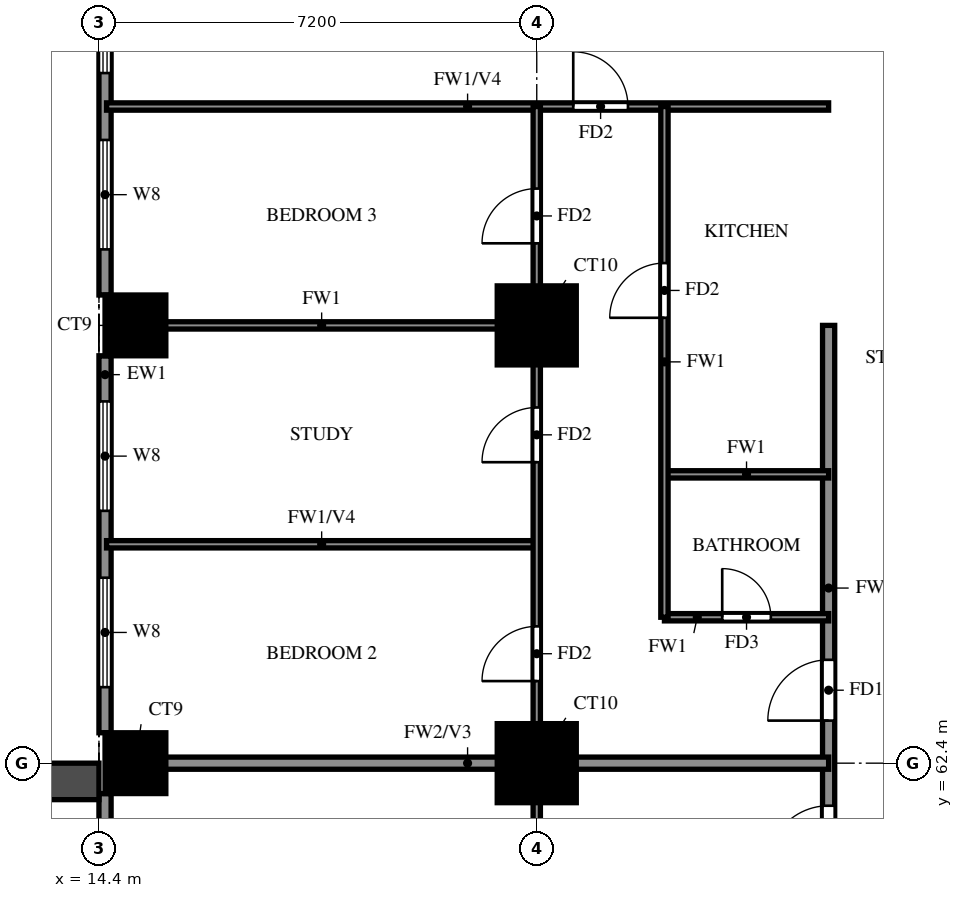
"""IFC4 building model, lengths in metres.
Left out: names, types, materials, properties, quantities, classifications, styles, units other than length and angle.
Written with IfcOpenShell. Run it as: python <this file> out.ifc"""

import sys

from ifc_helpers import new_model, si_unit, direction, frame, frame_2d, origin, origin_2d, place, context, subcontext, project, spatial, rectangle, extrude, source, transform, mapped, element, fill, save


model = new_model("IFC4")
c1 = context("Model", 3, precision=1e-05, world=origin(), true_north=direction((0.0, 1.0)))
c2 = subcontext(c1, "Body", "Model", "MODEL_VIEW")
j1 = project(units=[si_unit("LENGTHUNIT", "METRE"), si_unit("PLANEANGLEUNIT", "RADIAN")], contexts=[c1])
p1 = place(None, origin())
s1 = spatial("IfcSite", under=j1, at=p1, CompositionType="ELEMENT")
p2 = place(p1, origin())
s2 = spatial("IfcBuilding", under=s1, at=p2, CompositionType="ELEMENT")
p3 = place(p2, frame((0.0, 0.0, 69.0)))
s3 = spatial("IfcBuildingStorey", under=s2, at=p3, CompositionType="ELEMENT", Elevation=69.0)
m1 = source(origin(), c2, "Body", "SweptSolid", [
    extrude(rectangle(XDim=1.0, YDim=1.0, at=origin_2d()), origin(), (0.0, 0.0, 1.0), 3.18),
])
p4 = place(p3, frame((15.0, 62.4, 0.0), z_axis=(0.0, 0.0, 1.0), x_axis=(1.0, 0.0, 0.0)))
e1 = element("IfcColumn", 1, at=p4, inside=s3, PredefinedType="COLUMN", context=c2, shape_type="MappedRepresentation", body=[
    mapped(m1, transform((0.0, 0.0, 0.0))),
])
m2 = source(origin(), c2, "Body", "SweptSolid", [
    extrude(rectangle(XDim=1.3, YDim=1.3, at=origin_2d()), origin(), (0.0, 0.0, 1.0), 3.18),
])
p5 = place(p3, frame((21.6, 62.4, 0.0), z_axis=(0.0, 0.0, 1.0), x_axis=(1.0, 0.0, 0.0)))
e2 = element("IfcColumn", 2, at=p5, inside=s3, PredefinedType="COLUMN", context=c2, shape_type="MappedRepresentation", body=[
    mapped(m2, transform((0.0, 0.0, 0.0))),
])
p6 = place(p3, frame((15.0, 69.6, 0.0), z_axis=(0.0, 0.0, 1.0), x_axis=(1.0, 0.0, 0.0)))
e3 = element("IfcColumn", 3, at=p6, inside=s3, PredefinedType="COLUMN", context=c2, shape_type="MappedRepresentation", body=[
    mapped(m1, transform((0.0, 0.0, 0.0))),
])
p7 = place(p3, frame((21.6, 69.6, 0.0), z_axis=(0.0, 0.0, 1.0), x_axis=(1.0, 0.0, 0.0)))
e4 = element("IfcColumn", 4, at=p7, inside=s3, PredefinedType="COLUMN", context=c2, shape_type="MappedRepresentation", body=[
    mapped(m2, transform((0.0, 0.0, 0.0))),
])
p8 = place(p3, frame((14.5, 76.3, 0.0), z_axis=(0.0, 0.0, 1.0), x_axis=(0.0, -1.0, 0.0)))
e5 = element("IfcWall", 5, at=p8, inside=s3, PredefinedType="SOLIDWALL", context=c2, shape_type="SweptSolid", body=[
    extrude(rectangle(XDim=6.2, YDim=0.2, at=frame_2d((3.1, 0.0))), origin(), (0.0, 0.0, 1.0), 3.18),
])
p9 = place(p8, frame((3.65, 0.0, 0.6)))
e6 = element("IfcOpeningElement", 6, at=p9, cuts=e5, PredefinedType="OPENING", context=c2, shape_type="SweptSolid", body=[
    extrude(rectangle(XDim=1.8, YDim=2.4, at=frame_2d((0.9, 1.2))), frame((0.0, 0.11, 0.0), z_axis=(0.0, -1.0, 0.0), x_axis=(1.0, 0.0, 0.0)), (0.0, 0.0, 1.0), 0.22),
])
p10 = place(p8, frame((0.75, 0.0, 0.6)))
e7 = element("IfcOpeningElement", 7, at=p10, cuts=e5, PredefinedType="OPENING", context=c2, shape_type="SweptSolid", body=[
    extrude(rectangle(XDim=1.8, YDim=2.4, at=frame_2d((0.9, 1.2))), frame((0.0, 0.11, 0.0), z_axis=(0.0, -1.0, 0.0), x_axis=(1.0, 0.0, 0.0)), (0.0, 0.0, 1.0), 0.22),
])
p11 = place(p3, frame((14.5, 69.1, 0.0), z_axis=(0.0, 0.0, 1.0), x_axis=(0.0, -1.0, 0.0)))
e8 = element("IfcWall", 8, at=p11, inside=s3, PredefinedType="SOLIDWALL", context=c2, shape_type="SweptSolid", body=[
    extrude(rectangle(XDim=6.2, YDim=0.2, at=frame_2d((3.1, 0.0))), origin(), (0.0, 0.0, 1.0), 3.18),
])
p12 = place(p11, frame((3.65, 0.0, 0.6)))
e9 = element("IfcOpeningElement", 9, at=p12, cuts=e8, PredefinedType="OPENING", context=c2, shape_type="SweptSolid", body=[
    extrude(rectangle(XDim=1.8, YDim=2.4, at=frame_2d((0.9, 1.2))), frame((0.0, 0.11, 0.0), z_axis=(0.0, -1.0, 0.0), x_axis=(1.0, 0.0, 0.0)), (0.0, 0.0, 1.0), 0.22),
])
p13 = place(p11, frame((0.75, 0.0, 0.6)))
e10 = element("IfcOpeningElement", 10, at=p13, cuts=e8, PredefinedType="OPENING", context=c2, shape_type="SweptSolid", body=[
    extrude(rectangle(XDim=1.8, YDim=2.4, at=frame_2d((0.9, 1.2))), frame((0.0, 0.11, 0.0), z_axis=(0.0, -1.0, 0.0), x_axis=(1.0, 0.0, 0.0)), (0.0, 0.0, 1.0), 0.22),
])
p14 = place(p3, frame((14.5, 61.9, 0.0), z_axis=(0.0, 0.0, 1.0), x_axis=(0.0, -1.0, 0.0)))
e11 = element("IfcWall", 11, at=p14, inside=s3, PredefinedType="SOLIDWALL", context=c2, shape_type="SweptSolid", body=[
    extrude(rectangle(XDim=6.2, YDim=0.2, at=frame_2d((3.1, 0.0))), origin(), (0.0, 0.0, 1.0), 3.18),
])
p15 = place(p14, frame((2.2, 0.0, 0.0)))
e12 = element("IfcOpeningElement", 12, at=p15, cuts=e11, PredefinedType="OPENING", context=c2, shape_type="SweptSolid", body=[
    extrude(rectangle(XDim=1.8, YDim=2.4, at=frame_2d((0.9, 1.2))), frame((0.0, 0.11, 0.0), z_axis=(0.0, -1.0, 0.0), x_axis=(1.0, 0.0, 0.0)), (0.0, 0.0, 1.0), 0.22),
])
p16 = place(p14, frame((0.45, 0.0, 0.6)))
e13 = element("IfcOpeningElement", 13, at=p16, cuts=e11, PredefinedType="OPENING", context=c2, shape_type="SweptSolid", body=[
    extrude(rectangle(XDim=1.2, YDim=2.4, at=frame_2d((0.6, 1.2))), frame((0.0, 0.11, 0.0), z_axis=(0.0, -1.0, 0.0), x_axis=(1.0, 0.0, 0.0)), (0.0, 0.0, 1.0), 0.22),
])
p17 = place(p14, frame((4.55, 0.0, 0.6)))
e14 = element("IfcOpeningElement", 14, at=p17, cuts=e11, PredefinedType="OPENING", context=c2, shape_type="SweptSolid", body=[
    extrude(rectangle(XDim=1.2, YDim=2.4, at=frame_2d((0.6, 1.2))), frame((0.0, 0.11, 0.0), z_axis=(0.0, -1.0, 0.0), x_axis=(1.0, 0.0, 0.0)), (0.0, 0.0, 1.0), 0.22),
])
p18 = place(p3, frame((14.4, 62.1, 0.0), z_axis=(0.0, 0.0, 1.0), x_axis=(-1.0, 0.0, 0.0)))
e15 = element("IfcWall", 15, at=p18, inside=s3, PredefinedType="SOLIDWALL", context=c2, shape_type="SweptSolid", body=[
    extrude(rectangle(XDim=2.7, YDim=0.6, at=frame_2d((1.35, 0.0))), origin(), (0.0, 0.0, 1.0), 2.85),
])
p19 = place(p3, frame((26.4, 60.0, 0.0), z_axis=(0.0, 0.0, 1.0), x_axis=(0.0, 1.0, 0.0)))
e16 = element("IfcWall", 16, at=p19, inside=s3, PredefinedType="SOLIDWALL", context=c2, shape_type="SweptSolid", body=[
    extrude(rectangle(XDim=9.6, YDim=0.2, at=frame_2d((4.8, 0.0))), origin(), (0.0, 0.0, 1.0), 3.18),
])
p20 = place(p19, frame((0.7, 0.0, 0.0)))
e17 = element("IfcOpeningElement", 17, at=p20, cuts=e16, PredefinedType="OPENING", context=c2, shape_type="SweptSolid", body=[
    extrude(rectangle(XDim=1.0, YDim=2.1, at=frame_2d((0.5, 1.05))), frame((0.0, 0.11, 0.0), z_axis=(0.0, -1.0, 0.0), x_axis=(1.0, 0.0, 0.0)), (0.0, 0.0, 1.0), 0.22),
])
p21 = place(p19, frame((3.1, 0.0, 0.0)))
e18 = element("IfcOpeningElement", 18, at=p21, cuts=e16, PredefinedType="OPENING", context=c2, shape_type="SweptSolid", body=[
    extrude(rectangle(XDim=1.0, YDim=2.1, at=frame_2d((0.5, 1.05))), frame((0.0, 0.11, 0.0), z_axis=(0.0, -1.0, 0.0), x_axis=(1.0, 0.0, 0.0)), (0.0, 0.0, 1.0), 0.22),
])
p22 = place(p3, frame((14.525, 62.4, 0.0), z_axis=(0.0, 0.0, 1.0), x_axis=(1.0, 0.0, 0.0)))
e19 = element("IfcWall", 19, at=p22, inside=s3, PredefinedType="SOLIDWALL", context=c2, shape_type="SweptSolid", body=[
    extrude(rectangle(XDim=11.875, YDim=0.2, at=frame_2d((5.938, 0.0))), origin(), (0.0, 0.0, 1.0), 3.18),
])
p23 = place(p3, frame((23.7, 64.8, 0.0), z_axis=(0.0, 0.0, 1.0), x_axis=(1.0, 0.0, 0.0)))
e20 = element("IfcWall", 20, at=p23, inside=s3, PredefinedType="PARTITIONING", context=c2, shape_type="SweptSolid", body=[
    extrude(rectangle(XDim=2.7, YDim=0.12, at=frame_2d((1.35, 0.0))), origin(), (0.0, 0.0, 1.0), 3.18),
])
p24 = place(p23, frame((0.95, 0.0, 0.0)))
e21 = element("IfcOpeningElement", 21, at=p24, cuts=e20, PredefinedType="OPENING", context=c2, shape_type="SweptSolid", body=[
    extrude(rectangle(XDim=0.8, YDim=2.1, at=frame_2d((0.4, 1.05))), frame((0.0, 0.07, 0.0), z_axis=(0.0, -1.0, 0.0), x_axis=(1.0, 0.0, 0.0)), (0.0, 0.0, 1.0), 0.14),
])
p25 = place(p3, frame((14.525, 66.0, 0.0), z_axis=(0.0, 0.0, 1.0), x_axis=(1.0, 0.0, 0.0)))
e22 = element("IfcWall", 22, at=p25, inside=s3, PredefinedType="PARTITIONING", context=c2, shape_type="SweptSolid", body=[
    extrude(rectangle(XDim=7.075, YDim=0.12, at=frame_2d((3.538, 0.0))), origin(), (0.0, 0.0, 1.0), 2.28),
])
p26 = place(p3, frame((23.7, 67.15, 0.0), z_axis=(0.0, 0.0, 1.0), x_axis=(1.0, 0.0, 0.0)))
e23 = element("IfcWall", 23, at=p26, inside=s3, PredefinedType="PARTITIONING", context=c2, shape_type="SweptSolid", body=[
    extrude(rectangle(XDim=2.7, YDim=0.12, at=frame_2d((1.35, 0.0))), origin(), (0.0, 0.0, 1.0), 3.18),
])
p27 = place(p3, frame((14.525, 69.6, 0.0), z_axis=(0.0, 0.0, 1.0), x_axis=(1.0, 0.0, 0.0)))
e24 = element("IfcWall", 24, at=p27, inside=s3, PredefinedType="PARTITIONING", context=c2, shape_type="SweptSolid", body=[
    extrude(rectangle(XDim=7.075, YDim=0.12, at=frame_2d((3.538, 0.0))), origin(), (0.0, 0.0, 1.0), 3.18),
])
p28 = place(p3, frame((14.525, 73.2, 0.0), z_axis=(0.0, 0.0, 1.0), x_axis=(1.0, 0.0, 0.0)))
e25 = element("IfcWall", 25, at=p28, inside=s3, PredefinedType="PARTITIONING", context=c2, shape_type="SweptSolid", body=[
    extrude(rectangle(XDim=11.875, YDim=0.12, at=frame_2d((5.938, 0.0))), origin(), (0.0, 0.0, 1.0), 2.28),
])
p29 = place(p28, frame((7.675, 0.0, 0.0)))
e26 = element("IfcOpeningElement", 26, at=p29, cuts=e25, PredefinedType="OPENING", context=c2, shape_type="SweptSolid", body=[
    extrude(rectangle(XDim=0.9, YDim=2.1, at=frame_2d((0.45, 1.05))), frame((0.0, 0.07, 0.0), z_axis=(0.0, -1.0, 0.0), x_axis=(1.0, 0.0, 0.0)), (0.0, 0.0, 1.0), 0.14),
])
p30 = place(p3, frame((21.6, 33.725, 0.0), z_axis=(0.0, 0.0, 1.0), x_axis=(0.0, 1.0, 0.0)))
e27 = element("IfcWall", 27, at=p30, inside=s3, PredefinedType="PARTITIONING", context=c2, shape_type="SweptSolid", body=[
    extrude(rectangle(XDim=39.475, YDim=0.12, at=frame_2d((19.737, 0.0))), origin(), (0.0, 0.0, 1.0), 3.18),
])
p31 = place(p30, frame((7.775, 0.0, 0.0)))
e28 = element("IfcOpeningElement", 28, at=p31, cuts=e27, PredefinedType="OPENING", context=c2, shape_type="SweptSolid", body=[
    extrude(rectangle(XDim=0.9, YDim=2.1, at=frame_2d((0.45, 1.05))), frame((0.0, 0.07, 0.0), z_axis=(0.0, -1.0, 0.0), x_axis=(1.0, 0.0, 0.0)), (0.0, 0.0, 1.0), 0.14),
])
p32 = place(p30, frame((15.625, 0.0, 0.0)))
e29 = element("IfcOpeningElement", 29, at=p32, cuts=e27, PredefinedType="OPENING", context=c2, shape_type="SweptSolid", body=[
    extrude(rectangle(XDim=0.9, YDim=2.1, at=frame_2d((0.45, 1.05))), frame((0.0, 0.07, 0.0), z_axis=(0.0, -1.0, 0.0), x_axis=(1.0, 0.0, 0.0)), (0.0, 0.0, 1.0), 0.14),
])
p33 = place(p30, frame((19.225, 0.0, 0.0)))
e30 = element("IfcOpeningElement", 30, at=p33, cuts=e27, PredefinedType="OPENING", context=c2, shape_type="SweptSolid", body=[
    extrude(rectangle(XDim=0.9, YDim=2.1, at=frame_2d((0.45, 1.05))), frame((0.0, 0.07, 0.0), z_axis=(0.0, -1.0, 0.0), x_axis=(1.0, 0.0, 0.0)), (0.0, 0.0, 1.0), 0.14),
])
p34 = place(p30, frame((24.325, 0.0, 0.0)))
e31 = element("IfcOpeningElement", 31, at=p34, cuts=e27, PredefinedType="OPENING", context=c2, shape_type="SweptSolid", body=[
    extrude(rectangle(XDim=1.5, YDim=2.1, at=frame_2d((0.75, 1.05))), frame((0.0, 0.07, 0.0), z_axis=(0.0, -1.0, 0.0), x_axis=(1.0, 0.0, 0.0)), (0.0, 0.0, 1.0), 0.14),
])
p35 = place(p30, frame((30.025, 0.0, 0.0)))
e32 = element("IfcOpeningElement", 32, at=p35, cuts=e27, PredefinedType="OPENING", context=c2, shape_type="SweptSolid", body=[
    extrude(rectangle(XDim=0.9, YDim=2.1, at=frame_2d((0.45, 1.05))), frame((0.0, 0.07, 0.0), z_axis=(0.0, -1.0, 0.0), x_axis=(1.0, 0.0, 0.0)), (0.0, 0.0, 1.0), 0.14),
])
p36 = place(p30, frame((33.625, 0.0, 0.0)))
e33 = element("IfcOpeningElement", 33, at=p36, cuts=e27, PredefinedType="OPENING", context=c2, shape_type="SweptSolid", body=[
    extrude(rectangle(XDim=0.9, YDim=2.1, at=frame_2d((0.45, 1.05))), frame((0.0, 0.07, 0.0), z_axis=(0.0, -1.0, 0.0), x_axis=(1.0, 0.0, 0.0)), (0.0, 0.0, 1.0), 0.14),
])
p37 = place(p30, frame((37.225, 0.0, 0.0)))
e34 = element("IfcOpeningElement", 34, at=p37, cuts=e27, PredefinedType="OPENING", context=c2, shape_type="SweptSolid", body=[
    extrude(rectangle(XDim=0.9, YDim=2.1, at=frame_2d((0.45, 1.05))), frame((0.0, 0.07, 0.0), z_axis=(0.0, -1.0, 0.0), x_axis=(1.0, 0.0, 0.0)), (0.0, 0.0, 1.0), 0.14),
])
p38 = place(p3, frame((23.7, 64.8, 0.0), z_axis=(0.0, 0.0, 1.0), x_axis=(0.0, 1.0, 0.0)))
e35 = element("IfcWall", 35, at=p38, inside=s3, PredefinedType="PARTITIONING", context=c2, shape_type="SweptSolid", body=[
    extrude(rectangle(XDim=8.4, YDim=0.12, at=frame_2d((4.2, 0.0))), origin(), (0.0, 0.0, 1.0), 3.18),
])
p39 = place(p38, frame((4.925, 0.0, 0.0)))
e36 = element("IfcOpeningElement", 36, at=p39, cuts=e35, PredefinedType="OPENING", context=c2, shape_type="SweptSolid", body=[
    extrude(rectangle(XDim=0.9, YDim=2.1, at=frame_2d((0.45, 1.05))), frame((0.0, 0.07, 0.0), z_axis=(0.0, -1.0, 0.0), x_axis=(1.0, 0.0, 0.0)), (0.0, 0.0, 1.0), 0.14),
])
p40 = place(p9, origin())
e37 = element("IfcWindow", 37, at=p40, inside=s3, PartitioningType="DOUBLE_PANEL_VERTICAL", PredefinedType="WINDOW", context=c2, shape_type="SweptSolid", body=[
    extrude(rectangle(XDim=1.8, YDim=2.4, at=frame_2d((0.9, 1.2))), frame((0.0, 0.03, 0.0), z_axis=(0.0, -1.0, 0.0), x_axis=(1.0, 0.0, 0.0)), (0.0, 0.0, 1.0), 0.06),
])
fill(e6, e37)
p41 = place(p10, origin())
e38 = element("IfcWindow", 38, at=p41, inside=s3, PartitioningType="DOUBLE_PANEL_VERTICAL", PredefinedType="WINDOW", context=c2, shape_type="SweptSolid", body=[
    extrude(rectangle(XDim=1.8, YDim=2.4, at=frame_2d((0.9, 1.2))), frame((0.0, 0.03, 0.0), z_axis=(0.0, -1.0, 0.0), x_axis=(1.0, 0.0, 0.0)), (0.0, 0.0, 1.0), 0.06),
])
fill(e7, e38)
p42 = place(p12, origin())
e39 = element("IfcWindow", 39, at=p42, inside=s3, PartitioningType="DOUBLE_PANEL_VERTICAL", PredefinedType="WINDOW", context=c2, shape_type="SweptSolid", body=[
    extrude(rectangle(XDim=1.8, YDim=2.4, at=frame_2d((0.9, 1.2))), frame((0.0, 0.03, 0.0), z_axis=(0.0, -1.0, 0.0), x_axis=(1.0, 0.0, 0.0)), (0.0, 0.0, 1.0), 0.06),
])
fill(e9, e39)
p43 = place(p13, origin())
e40 = element("IfcWindow", 40, at=p43, inside=s3, PartitioningType="DOUBLE_PANEL_VERTICAL", PredefinedType="WINDOW", context=c2, shape_type="SweptSolid", body=[
    extrude(rectangle(XDim=1.8, YDim=2.4, at=frame_2d((0.9, 1.2))), frame((0.0, 0.03, 0.0), z_axis=(0.0, -1.0, 0.0), x_axis=(1.0, 0.0, 0.0)), (0.0, 0.0, 1.0), 0.06),
])
fill(e10, e40)
p44 = place(p20, origin())
e41 = element("IfcDoor", 41, at=p44, inside=s3, OperationType="SINGLE_SWING_LEFT", PredefinedType="DOOR", context=c2, shape_type="SweptSolid", body=[
    extrude(rectangle(XDim=1.0, YDim=2.1, at=frame_2d((0.5, 1.05))), frame((0.0, 0.025, 0.0), z_axis=(0.0, -1.0, 0.0), x_axis=(1.0, 0.0, 0.0)), (0.0, 0.0, 1.0), 0.05),
])
fill(e17, e41)
p45 = place(p21, origin())
e42 = element("IfcDoor", 42, at=p45, inside=s3, OperationType="SINGLE_SWING_LEFT", PredefinedType="DOOR", context=c2, shape_type="SweptSolid", body=[
    extrude(rectangle(XDim=1.0, YDim=2.1, at=frame_2d((0.5, 1.05))), frame((0.0, 0.025, 0.0), z_axis=(0.0, -1.0, 0.0), x_axis=(1.0, 0.0, 0.0)), (0.0, 0.0, 1.0), 0.05),
])
fill(e18, e42)
p46 = place(p35, origin())
e43 = element("IfcDoor", 43, at=p46, inside=s3, OperationType="SINGLE_SWING_LEFT", PredefinedType="DOOR", context=c2, shape_type="SweptSolid", body=[
    extrude(rectangle(XDim=0.9, YDim=2.1, at=frame_2d((0.45, 1.05))), frame((0.0, 0.025, 0.0), z_axis=(0.0, -1.0, 0.0), x_axis=(1.0, 0.0, 0.0)), (0.0, 0.0, 1.0), 0.05),
])
fill(e32, e43)
p47 = place(p36, origin())
e44 = element("IfcDoor", 44, at=p47, inside=s3, OperationType="SINGLE_SWING_RIGHT", PredefinedType="DOOR", context=c2, shape_type="SweptSolid", body=[
    extrude(rectangle(XDim=0.9, YDim=2.1, at=frame_2d((0.45, 1.05))), frame((0.0, 0.025, 0.0), z_axis=(0.0, -1.0, 0.0), x_axis=(1.0, 0.0, 0.0)), (0.0, 0.0, 1.0), 0.05),
])
fill(e33, e44)
p48 = place(p37, origin())
e45 = element("IfcDoor", 45, at=p48, inside=s3, OperationType="SINGLE_SWING_LEFT", PredefinedType="DOOR", context=c2, shape_type="SweptSolid", body=[
    extrude(rectangle(XDim=0.9, YDim=2.1, at=frame_2d((0.45, 1.05))), frame((0.0, 0.025, 0.0), z_axis=(0.0, -1.0, 0.0), x_axis=(1.0, 0.0, 0.0)), (0.0, 0.0, 1.0), 0.05),
])
fill(e34, e45)
p49 = place(p29, origin())
e46 = element("IfcDoor", 46, at=p49, inside=s3, OperationType="SINGLE_SWING_LEFT", PredefinedType="DOOR", context=c2, shape_type="SweptSolid", body=[
    extrude(rectangle(XDim=0.9, YDim=2.1, at=frame_2d((0.45, 1.05))), frame((0.0, 0.025, 0.0), z_axis=(0.0, -1.0, 0.0), x_axis=(1.0, 0.0, 0.0)), (0.0, 0.0, 1.0), 0.05),
])
fill(e26, e46)
p50 = place(p24, origin())
e47 = element("IfcDoor", 47, at=p50, inside=s3, OperationType="SINGLE_SWING_RIGHT", PredefinedType="DOOR", context=c2, shape_type="SweptSolid", body=[
    extrude(rectangle(XDim=0.8, YDim=2.1, at=frame_2d((0.4, 1.05))), frame((0.0, 0.025, 0.0), z_axis=(0.0, -1.0, 0.0), x_axis=(1.0, 0.0, 0.0)), (0.0, 0.0, 1.0), 0.05),
])
fill(e21, e47)
p51 = place(p39, origin())
e48 = element("IfcDoor", 48, at=p51, inside=s3, OperationType="SINGLE_SWING_LEFT", PredefinedType="DOOR", context=c2, shape_type="SweptSolid", body=[
    extrude(rectangle(XDim=0.9, YDim=2.1, at=frame_2d((0.45, 1.05))), frame((0.0, 0.025, 0.0), z_axis=(0.0, -1.0, 0.0), x_axis=(1.0, 0.0, 0.0)), (0.0, 0.0, 1.0), 0.05),
])
fill(e36, e48)
save(model, sys.argv[1])
